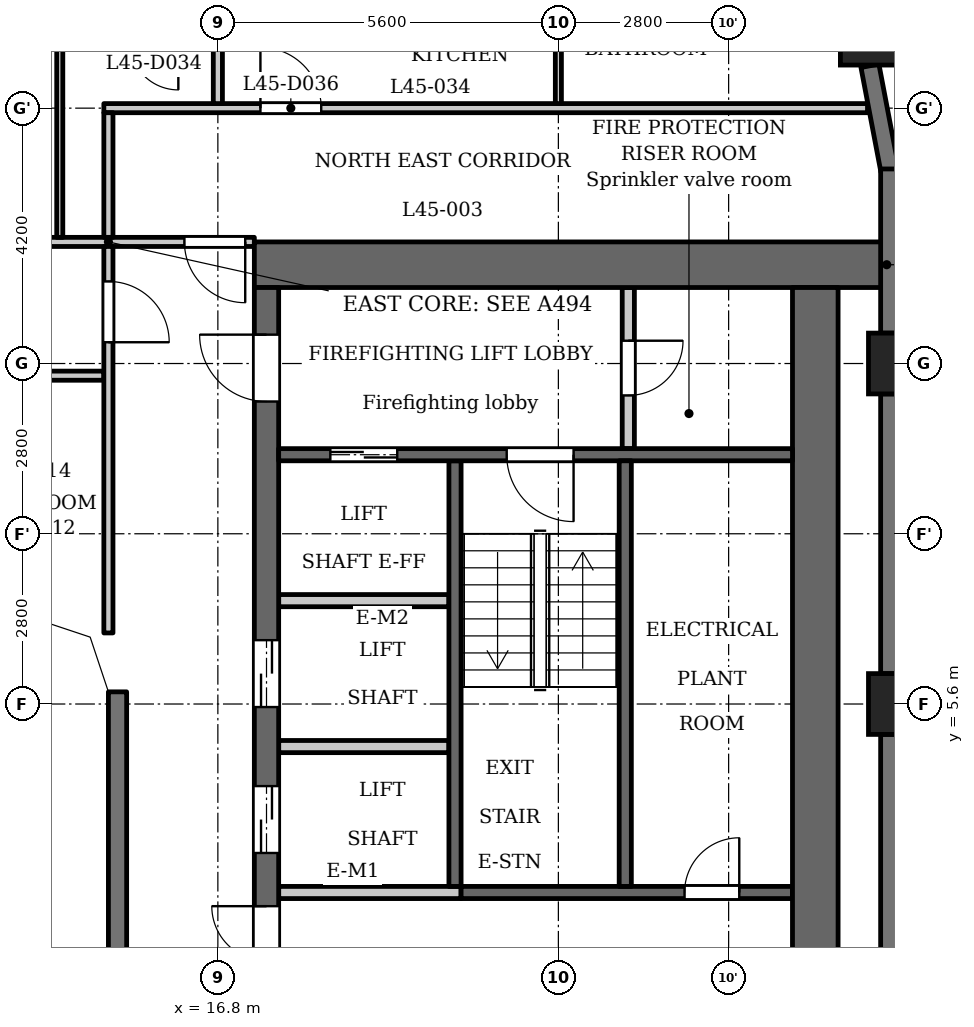
"""IFC4 building model, lengths in metres.
Left out: names, types, materials, properties, quantities, classifications, styles, units other than length and angle.
Written with IfcOpenShell. Run it as: python <this file> out.ifc"""

import sys

from ifc_helpers import new_model, si_unit, direction, frame, frame_2d, origin, origin_2d, place, context, subcontext, project, spatial, polyline, rectangle, outline, extrude, element, fill, save


model = new_model("IFC4")
c1 = context("Model", 3, precision=1e-05, world=origin(), true_north=direction((0.0, 1.0)))
c2 = subcontext(c1, "Body", "Model", "MODEL_VIEW")
j1 = project(units=[si_unit("LENGTHUNIT", "METRE"), si_unit("PLANEANGLEUNIT", "RADIAN")], contexts=[c1])
p1 = place(None, origin())
s1 = spatial("IfcSite", under=j1, at=p1, CompositionType="ELEMENT")
p2 = place(p1, origin())
s2 = spatial("IfcBuilding", under=s1, at=p2, CompositionType="ELEMENT")
p3 = place(p2, frame((0.0, 0.0, 174.6)))
s3 = spatial("IfcBuildingStorey", under=s2, at=p3, CompositionType="ELEMENT", Elevation=174.6)
for number, where, z_axis, x_axis in (
    (1, (28.0, 5.6, 0.0), (0.0, 0.0, 1.0), (1.0, 0.0, 0.0)),
    (2, (28.0, 11.2, 0.0), (0.0, 0.0, 1.0), (1.0, 0.0, 0.0)),
    (3, (27.538, 16.609, 0.0), (0.0, 0.0, 1.0), (1.0, 0.0, 0.0)),
):
    element("IfcColumn", number, at=place(p3, frame(where, z_axis=z_axis, x_axis=x_axis)), inside=s3, PredefinedType="COLUMN", context=c2, shape_type="SweptSolid", body=[
        extrude(rectangle(XDim=1.0, YDim=1.0, at=origin_2d()), origin(), (0.0, 0.0, 1.0), 3.5),
    ])
p4 = place(p3, frame((27.85, 0.5, 0.0), z_axis=(0.0, 0.0, 1.0), x_axis=(0.0, 1.0, 0.0)))
e4 = element("IfcWall", 4, at=p4, inside=s3, PredefinedType="SOLIDWALL", context=c2, shape_type="SweptSolid", body=[
    extrude(rectangle(XDim=4.6, YDim=0.3, at=frame_2d((2.3, 0.0))), origin(), (0.0, 0.0, 1.0), 2.4),
])
p5 = place(p3, frame((27.85, 6.1, 0.0), z_axis=(0.0, 0.0, 1.0), x_axis=(0.0, 1.0, 0.0)))
e5 = element("IfcWall", 5, at=p5, inside=s3, PredefinedType="SOLIDWALL", context=c2, shape_type="SweptSolid", body=[
    extrude(rectangle(XDim=4.6, YDim=0.3, at=frame_2d((2.3, 0.0))), origin(), (0.0, 0.0, 1.0), 2.4),
])
p6 = place(p3, frame((27.85, 11.7, 0.0), z_axis=(0.0, 0.0, 1.0), x_axis=(0.0, 1.0, 0.0)))
e6 = element("IfcWall", 6, at=p6, inside=s3, PredefinedType="SOLIDWALL", context=c2, shape_type="SweptSolid", body=[
    extrude(rectangle(XDim=2.7, YDim=0.3, at=frame_2d((1.35, 0.0))), origin(), (0.0, 0.0, 1.0), 2.4),
])
p7 = place(p3, frame((27.853, 14.372, 0.0), z_axis=(0.0, 0.0, 1.0), x_axis=(-0.187259034321, 0.982310569049, 0.0)))
e7 = element("IfcWall", 7, at=p7, inside=s3, PredefinedType="SOLIDWALL", context=c2, shape_type="SweptSolid", body=[
    extrude(rectangle(XDim=1.756, YDim=0.3, at=frame_2d((0.878, 0.0))), origin(), (0.0, 0.0, 1.0), 2.4),
])
p8 = place(p3, frame((15.15, 5.8, 0.0), z_axis=(0.0, 0.0, 1.0), x_axis=(0.0, -1.0, 0.0)))
e8 = element("IfcWall", 8, at=p8, inside=s3, PredefinedType="SOLIDWALL", context=c2, shape_type="SweptSolid", body=[
    extrude(rectangle(XDim=11.6, YDim=0.3, at=frame_2d((5.8, 0.0))), origin(), (0.0, 0.0, 1.0), 3.15),
])
p9 = place(p3, frame((20.7, 2.6, 0.0), z_axis=(0.0, 0.0, 1.0), x_axis=(0.0, 1.0, 0.0)))
e9 = element("IfcWall", 9, at=p9, inside=s3, PredefinedType="SHEAR", context=c2, shape_type="SweptSolid", body=[
    extrude(rectangle(XDim=7.0, YDim=0.2, at=frame_2d((3.5, 0.0))), origin(), (0.0, 0.0, 1.0), 3.15),
])
p10 = place(p3, frame((20.8, 2.5, 0.0), z_axis=(0.0, 0.0, 1.0), x_axis=(1.0, 0.0, 0.0)))
e10 = element("IfcWall", 10, at=p10, inside=s3, PredefinedType="SHEAR", context=c2, shape_type="SweptSolid", body=[
    extrude(rectangle(XDim=5.45, YDim=0.2, at=frame_2d((2.725, 0.0))), origin(), (0.0, 0.0, 1.0), 3.15),
])
p11 = place(p10, frame((3.675, 0.0, 0.0)))
e11 = element("IfcOpeningElement", 11, at=p11, cuts=e10, PredefinedType="OPENING", context=c2, shape_type="SweptSolid", body=[
    extrude(rectangle(XDim=0.9, YDim=2.1, at=frame_2d((0.45, 1.05))), frame((0.0, 0.11, 0.0), z_axis=(0.0, -1.0, 0.0), x_axis=(1.0, 0.0, 0.0)), (0.0, 0.0, 1.0), 0.22),
])
p12 = place(p3, frame((17.4, 12.825, 0.0), z_axis=(0.0, 0.0, 1.0), x_axis=(1.0, 0.0, 0.0)))
e12 = element("IfcWall", 12, at=p12, inside=s3, PredefinedType="SHEAR", context=c2, shape_type="SweptSolid", body=[
    extrude(rectangle(XDim=10.4, YDim=0.75, at=frame_2d((5.2, 0.0))), origin(), (0.0, 0.0, 1.0), 3.15),
])
p13 = place(p3, frame((17.6, -12.45, 0.0), z_axis=(0.0, 0.0, 1.0), x_axis=(0.0, 1.0, 0.0)))
e13 = element("IfcWall", 13, at=p13, inside=s3, PredefinedType="SHEAR", context=c2, shape_type="SweptSolid", body=[
    extrude(rectangle(XDim=24.9, YDim=0.4, at=frame_2d((12.45, 0.0))), origin(), (0.0, 0.0, 1.0), 3.15),
])
p14 = place(p13, frame((8.65, 0.0, 0.0)))
e14 = element("IfcOpeningElement", 14, at=p14, cuts=e13, PredefinedType="OPENING", context=c2, shape_type="SweptSolid", body=[
    extrude(rectangle(XDim=0.9, YDim=2.1, at=frame_2d((0.45, 1.05))), frame((0.0, 0.21, 0.0), z_axis=(0.0, -1.0, 0.0), x_axis=(1.0, 0.0, 0.0)), (0.0, 0.0, 1.0), 0.42),
])
p15 = place(p13, frame((15.6, 0.0, 0.0)))
e15 = element("IfcOpeningElement", 15, at=p15, cuts=e13, PredefinedType="OPENING", context=c2, shape_type="SweptSolid", body=[
    extrude(rectangle(XDim=1.1, YDim=2.1, at=frame_2d((0.55, 1.05))), frame((0.0, 0.21, 0.0), z_axis=(0.0, -1.0, 0.0), x_axis=(1.0, 0.0, 0.0)), (0.0, 0.0, 1.0), 0.42),
])
p16 = place(p13, frame((18.0, 0.0, 0.0)))
e16 = element("IfcOpeningElement", 16, at=p16, cuts=e13, PredefinedType="OPENING", context=c2, shape_type="SweptSolid", body=[
    extrude(rectangle(XDim=1.1, YDim=2.1, at=frame_2d((0.55, 1.05))), frame((0.0, 0.21, 0.0), z_axis=(0.0, -1.0, 0.0), x_axis=(1.0, 0.0, 0.0)), (0.0, 0.0, 1.0), 0.42),
])
p17 = place(p13, frame((23.025, 0.0, 0.0)))
e17 = element("IfcOpeningElement", 17, at=p17, cuts=e13, PredefinedType="OPENING", context=c2, shape_type="SweptSolid", body=[
    extrude(rectangle(XDim=1.1, YDim=2.1, at=frame_2d((0.55, 1.05))), frame((0.0, 0.21, 0.0), z_axis=(0.0, -1.0, 0.0), x_axis=(1.0, 0.0, 0.0)), (0.0, 0.0, 1.0), 0.42),
])
p18 = place(p13, frame((0.775, 0.0, 0.0)))
e18 = element("IfcOpeningElement", 18, at=p18, cuts=e13, PredefinedType="OPENING", context=c2, shape_type="SweptSolid", body=[
    extrude(rectangle(XDim=1.1, YDim=2.1, at=frame_2d((0.55, 1.05))), frame((0.0, 0.21, 0.0), z_axis=(0.0, -1.0, 0.0), x_axis=(1.0, 0.0, 0.0)), (0.0, 0.0, 1.0), 0.42),
])
p19 = place(p13, frame((12.925, 0.0, 0.0)))
e19 = element("IfcOpeningElement", 19, at=p19, cuts=e13, PredefinedType="OPENING", context=c2, shape_type="SweptSolid", body=[
    extrude(rectangle(XDim=1.8, YDim=2.1, at=frame_2d((0.9, 1.05))), frame((0.0, 0.21, 0.0), z_axis=(0.0, -1.0, 0.0), x_axis=(1.0, 0.0, 0.0)), (0.0, 0.0, 1.0), 0.42),
])
p20 = place(p3, frame((26.625, -12.45, 0.0), z_axis=(0.0, 0.0, 1.0), x_axis=(0.0, 1.0, 0.0)))
e20 = element("IfcWall", 20, at=p20, inside=s3, PredefinedType="SHEAR", context=c2, shape_type="SweptSolid", body=[
    extrude(rectangle(XDim=24.9, YDim=0.75, at=frame_2d((12.45, 0.0))), origin(), (0.0, 0.0, 1.0), 3.15),
])
p21 = place(p3, frame((23.55, 9.8, 0.0), z_axis=(0.0, 0.0, 1.0), x_axis=(0.0, 1.0, 0.0)))
e21 = element("IfcWall", 21, at=p21, inside=s3, PredefinedType="PARTITIONING", context=c2, shape_type="SweptSolid", body=[
    extrude(rectangle(XDim=2.65, YDim=0.2, at=frame_2d((1.325, 0.0))), origin(), (0.0, 0.0, 1.0), 3.15),
])
p22 = place(p21, frame((0.875, 0.0, 0.0)))
e22 = element("IfcOpeningElement", 22, at=p22, cuts=e21, PredefinedType="OPENING", context=c2, shape_type="SweptSolid", body=[
    extrude(rectangle(XDim=0.9, YDim=2.1, at=frame_2d((0.45, 1.05))), frame((0.0, 0.11, 0.0), z_axis=(0.0, -1.0, 0.0), x_axis=(1.0, 0.0, 0.0)), (0.0, 0.0, 1.0), 0.22),
])
p23 = place(p3, frame((17.8, 2.5, 0.0), z_axis=(0.0, 0.0, 1.0), x_axis=(1.0, 0.0, 0.0)))
e23 = element("IfcWall", 23, at=p23, inside=s3, PredefinedType="PARTITIONING", context=c2, shape_type="SweptSolid", body=[
    extrude(rectangle(XDim=3.0, YDim=0.2, at=frame_2d((1.5, 0.0))), origin(), (0.0, 0.0, 1.0), 3.15),
])
for number, where, z_axis, x_axis in (
    (24, (17.8, 4.9, 0.0), (0.0, 0.0, 1.0), (1.0, 0.0, 0.0)),
    (25, (17.8, 7.3, 0.0), (0.0, 0.0, 1.0), (1.0, 0.0, 0.0)),
):
    element("IfcWall", number, at=place(p3, frame(where, z_axis=z_axis, x_axis=x_axis)), inside=s3, PredefinedType="PARTITIONING", context=c2, shape_type="SweptSolid", body=[
        extrude(rectangle(XDim=2.8, YDim=0.2, at=frame_2d((1.4, 0.0))), origin(), (0.0, 0.0, 1.0), 3.15),
    ])
p24 = place(p3, frame((17.8, 9.7, 0.0), z_axis=(0.0, 0.0, 1.0), x_axis=(1.0, 0.0, 0.0)))
e26 = element("IfcWall", 26, at=p24, inside=s3, PredefinedType="SHEAR", context=c2, shape_type="SweptSolid", body=[
    extrude(rectangle(XDim=8.45, YDim=0.2, at=frame_2d((4.225, 0.0))), origin(), (0.0, 0.0, 1.0), 3.15),
])
p25 = place(p24, frame((0.85, 0.0, 0.0)))
e27 = element("IfcOpeningElement", 27, at=p25, cuts=e26, PredefinedType="OPENING", context=c2, shape_type="SweptSolid", body=[
    extrude(rectangle(XDim=1.1, YDim=2.1, at=frame_2d((0.55, 1.05))), frame((0.0, 0.11, 0.0), z_axis=(0.0, -1.0, 0.0), x_axis=(1.0, 0.0, 0.0)), (0.0, 0.0, 1.0), 0.22),
])
p26 = place(p24, frame((3.75, 0.0, 0.0)))
e28 = element("IfcOpeningElement", 28, at=p26, cuts=e26, PredefinedType="OPENING", context=c2, shape_type="SweptSolid", body=[
    extrude(rectangle(XDim=1.1, YDim=2.1, at=frame_2d((0.55, 1.05))), frame((0.0, 0.11, 0.0), z_axis=(0.0, -1.0, 0.0), x_axis=(1.0, 0.0, 0.0)), (0.0, 0.0, 1.0), 0.22),
])
p27 = place(p3, frame((23.5, 2.6, 0.0), z_axis=(0.0, 0.0, 1.0), x_axis=(0.0, 1.0, 0.0)))
e29 = element("IfcWall", 29, at=p27, inside=s3, PredefinedType="SHEAR", context=c2, shape_type="SweptSolid", body=[
    extrude(rectangle(XDim=7.0, YDim=0.2, at=frame_2d((3.5, 0.0))), origin(), (0.0, 0.0, 1.0), 3.15),
])
p28 = place(p3, frame((-14.925, 11.0, 0.0), z_axis=(0.0, 0.0, 1.0), x_axis=(1.0, 0.0, 0.0)))
e30 = element("IfcWall", 30, at=p28, inside=s3, PredefinedType="PARTITIONING", context=c2, shape_type="SweptSolid", body=[
    extrude(rectangle(XDim=29.85, YDim=0.15, at=frame_2d((14.925, 0.0))), origin(), (0.0, 0.0, 1.0), 3.15),
])
p29 = place(p28, frame((2.475, 0.0, 0.0)))
e31 = element("IfcOpeningElement", 31, at=p29, cuts=e30, PredefinedType="OPENING", context=c2, shape_type="SweptSolid", body=[
    extrude(rectangle(XDim=1.0, YDim=2.1, at=frame_2d((0.5, 1.05))), frame((0.0, 0.085, 0.0), z_axis=(0.0, -1.0, 0.0), x_axis=(1.0, 0.0, 0.0)), (0.0, 0.0, 1.0), 0.17),
])
p30 = place(p28, frame((26.275, 0.0, 0.0)))
e32 = element("IfcOpeningElement", 32, at=p30, cuts=e30, PredefinedType="OPENING", context=c2, shape_type="SweptSolid", body=[
    extrude(rectangle(XDim=1.0, YDim=2.1, at=frame_2d((0.5, 1.05))), frame((0.0, 0.085, 0.0), z_axis=(0.0, -1.0, 0.0), x_axis=(1.0, 0.0, 0.0)), (0.0, 0.0, 1.0), 0.17),
])
p31 = place(p3, frame((-17.4, 13.2, 0.0), z_axis=(0.0, 0.0, 1.0), x_axis=(1.0, 0.0, 0.0)))
e33 = element("IfcWall", 33, at=p31, inside=s3, PredefinedType="PARTITIONING", context=c2, shape_type="SweptSolid", body=[
    extrude(rectangle(XDim=34.8, YDim=0.15, at=frame_2d((17.4, 0.0))), origin(), (0.0, 0.0, 1.0), 3.15),
])
p32 = place(p31, frame((0.25, 0.0, 0.0)))
e34 = element("IfcOpeningElement", 34, at=p32, cuts=e33, PredefinedType="OPENING", context=c2, shape_type="SweptSolid", body=[
    extrude(rectangle(XDim=1.0, YDim=2.1, at=frame_2d((0.5, 1.05))), frame((0.0, 0.085, 0.0), z_axis=(0.0, -1.0, 0.0), x_axis=(1.0, 0.0, 0.0)), (0.0, 0.0, 1.0), 0.17),
])
p33 = place(p31, frame((33.65, 0.0, 0.0)))
e35 = element("IfcOpeningElement", 35, at=p33, cuts=e33, PredefinedType="OPENING", context=c2, shape_type="SweptSolid", body=[
    extrude(rectangle(XDim=1.0, YDim=2.1, at=frame_2d((0.5, 1.05))), frame((0.0, 0.085, 0.0), z_axis=(0.0, -1.0, 0.0), x_axis=(1.0, 0.0, 0.0)), (0.0, 0.0, 1.0), 0.17),
])
p34 = place(p31, frame((10.15, 0.0, 0.0)))
e36 = element("IfcOpeningElement", 36, at=p34, cuts=e33, PredefinedType="OPENING", context=c2, shape_type="SweptSolid", body=[
    extrude(rectangle(XDim=1.0, YDim=2.1, at=frame_2d((0.5, 1.05))), frame((0.0, 0.085, 0.0), z_axis=(0.0, -1.0, 0.0), x_axis=(1.0, 0.0, 0.0)), (0.0, 0.0, 1.0), 0.17),
])
p35 = place(p31, frame((15.75, 0.0, 0.0)))
e37 = element("IfcOpeningElement", 37, at=p35, cuts=e33, PredefinedType="OPENING", context=c2, shape_type="SweptSolid", body=[
    extrude(rectangle(XDim=1.0, YDim=2.1, at=frame_2d((0.5, 1.05))), frame((0.0, 0.085, 0.0), z_axis=(0.0, -1.0, 0.0), x_axis=(1.0, 0.0, 0.0)), (0.0, 0.0, 1.0), 0.17),
])
p36 = place(p31, frame((24.95, 0.0, 0.0)))
e38 = element("IfcOpeningElement", 38, at=p36, cuts=e33, PredefinedType="OPENING", context=c2, shape_type="SweptSolid", body=[
    extrude(rectangle(XDim=1.0, YDim=2.1, at=frame_2d((0.5, 1.05))), frame((0.0, 0.085, 0.0), z_axis=(0.0, -1.0, 0.0), x_axis=(1.0, 0.0, 0.0)), (0.0, 0.0, 1.0), 0.17),
])
p37 = place(p31, frame((29.95, 0.0, 0.0)))
e39 = element("IfcOpeningElement", 39, at=p37, cuts=e33, PredefinedType="OPENING", context=c2, shape_type="SweptSolid", body=[
    extrude(rectangle(XDim=1.0, YDim=2.1, at=frame_2d((0.5, 1.05))), frame((0.0, 0.085, 0.0), z_axis=(0.0, -1.0, 0.0), x_axis=(1.0, 0.0, 0.0)), (0.0, 0.0, 1.0), 0.17),
])
p38 = place(p3, frame((14.925, 15.4, 0.0), z_axis=(0.0, 0.0, 1.0), x_axis=(1.0, 0.0, 0.0)))
e40 = element("IfcWall", 40, at=p38, inside=s3, PredefinedType="PARTITIONING", context=c2, shape_type="SweptSolid", body=[
    extrude(rectangle(XDim=12.559, YDim=0.15, at=frame_2d((6.279, 0.0))), origin(), (0.0, 0.0, 1.0), 3.15),
])
p39 = place(p38, frame((2.575, 0.0, 0.0)))
e41 = element("IfcOpeningElement", 41, at=p39, cuts=e40, PredefinedType="OPENING", context=c2, shape_type="SweptSolid", body=[
    extrude(rectangle(XDim=1.0, YDim=2.1, at=frame_2d((0.5, 1.05))), frame((0.0, 0.085, 0.0), z_axis=(0.0, -1.0, 0.0), x_axis=(1.0, 0.0, 0.0)), (0.0, 0.0, 1.0), 0.17),
])
p40 = place(p3, frame((14.2, 13.275, 0.0), z_axis=(0.0, 0.0, 1.0), x_axis=(0.0, 1.0, 0.0)))
e42 = element("IfcWall", 42, at=p40, inside=s3, PredefinedType="PARTITIONING", context=c2, shape_type="SweptSolid", body=[
    extrude(rectangle(XDim=3.175, YDim=0.1, at=frame_2d((1.587, 0.0))), origin(), (0.0, 0.0, 1.0), 3.15),
])
p41 = place(p3, frame((15.0, 6.769, 0.0), z_axis=(0.0, 0.0, 1.0), x_axis=(0.0, 1.0, 0.0)))
e43 = element("IfcWall", 43, at=p41, inside=s3, PredefinedType="PARTITIONING", context=c2, shape_type="SweptSolid", body=[
    extrude(rectangle(XDim=6.356, YDim=0.15, at=frame_2d((3.178, 0.0))), origin(), (0.0, 0.0, 1.0), 3.15),
])
p42 = place(p41, frame((4.781, 0.0, 0.0)))
e44 = element("IfcOpeningElement", 44, at=p42, cuts=e43, PredefinedType="OPENING", context=c2, shape_type="SweptSolid", body=[
    extrude(rectangle(XDim=1.0, YDim=2.1, at=frame_2d((0.5, 1.05))), frame((0.0, 0.085, 0.0), z_axis=(0.0, -1.0, 0.0), x_axis=(1.0, 0.0, 0.0)), (0.0, 0.0, 1.0), 0.17),
])
p43 = place(p3, frame((15.0, 13.275, 0.0), z_axis=(0.0, 0.0, 1.0), x_axis=(0.0, 1.0, 0.0)))
e45 = element("IfcWall", 45, at=p43, inside=s3, PredefinedType="PARTITIONING", context=c2, shape_type="SweptSolid", body=[
    extrude(rectangle(XDim=2.05, YDim=0.15, at=frame_2d((1.025, 0.0))), origin(), (0.0, 0.0, 1.0), 3.15),
])
p44 = place(p3, frame((16.8, 15.475, 0.0), z_axis=(0.0, 0.0, 1.0), x_axis=(0.0, 1.0, 0.0)))
e46 = element("IfcWall", 46, at=p44, inside=s3, PredefinedType="PARTITIONING", context=c2, shape_type="SweptSolid", body=[
    extrude(rectangle(XDim=7.405, YDim=0.15, at=frame_2d((3.702, 0.0))), origin(), (0.0, 0.0, 1.0), 3.15),
])
p45 = place(p3, frame((22.4, 15.475, 0.0), z_axis=(0.0, 0.0, 1.0), x_axis=(0.0, 1.0, 0.0)))
e47 = element("IfcWall", 47, at=p45, inside=s3, PredefinedType="PARTITIONING", context=c2, shape_type="SweptSolid", body=[
    extrude(rectangle(XDim=2.275, YDim=0.1, at=frame_2d((1.137, 0.0))), origin(), (0.0, 0.0, 1.0), 3.15),
])
p46 = place(p3, origin())
e48 = element("IfcWall", 48, at=p46, inside=s3, PredefinedType="SOLIDWALL", context=c2, shape_type="SweptSolid", body=[
    extrude(outline(polyline([(14.937, 6.937), (13.849, 7.3), (13.8, 7.3), (13.8, 7.0), (14.7, 6.7), (15.0, 5.8), (15.3, 5.8), (15.3, 5.849), (14.937, 6.937)])), origin(), (0.0, 0.0, 1.0), 3.15),
])
p47 = place(p15, origin())
e49 = element("IfcDoor", 49, at=p47, inside=s3, OperationType="DOUBLE_DOOR_SLIDING", PredefinedType="DOOR", context=c2, shape_type="SweptSolid", body=[
    extrude(rectangle(XDim=1.1, YDim=2.1, at=frame_2d((0.55, 1.05))), frame((0.0, 0.025, 0.0), z_axis=(0.0, -1.0, 0.0), x_axis=(1.0, 0.0, 0.0)), (0.0, 0.0, 1.0), 0.05),
])
fill(e15, e49)
p48 = place(p16, origin())
e50 = element("IfcDoor", 50, at=p48, inside=s3, OperationType="DOUBLE_DOOR_SLIDING", PredefinedType="DOOR", context=c2, shape_type="SweptSolid", body=[
    extrude(rectangle(XDim=1.1, YDim=2.1, at=frame_2d((0.55, 1.05))), frame((0.0, 0.025, 0.0), z_axis=(0.0, -1.0, 0.0), x_axis=(1.0, 0.0, 0.0)), (0.0, 0.0, 1.0), 0.05),
])
fill(e16, e50)
p49 = place(p25, origin())
e51 = element("IfcDoor", 51, at=p49, inside=s3, OperationType="DOUBLE_DOOR_SLIDING", PredefinedType="DOOR", context=c2, shape_type="SweptSolid", body=[
    extrude(rectangle(XDim=1.1, YDim=2.1, at=frame_2d((0.55, 1.05))), frame((0.0, 0.025, 0.0), z_axis=(0.0, -1.0, 0.0), x_axis=(1.0, 0.0, 0.0)), (0.0, 0.0, 1.0), 0.05),
])
fill(e27, e51)
p50 = place(p17, origin())
e52 = element("IfcDoor", 52, at=p50, inside=s3, OperationType="SINGLE_SWING_LEFT", PredefinedType="DOOR", context=c2, shape_type="SweptSolid", body=[
    extrude(rectangle(XDim=1.1, YDim=2.1, at=frame_2d((0.55, 1.05))), frame((0.0, 0.025, 0.0), z_axis=(0.0, -1.0, 0.0), x_axis=(1.0, 0.0, 0.0)), (0.0, 0.0, 1.0), 0.05),
])
fill(e17, e52)
p51 = place(p22, origin())
e53 = element("IfcDoor", 53, at=p51, inside=s3, OperationType="SINGLE_SWING_RIGHT", PredefinedType="DOOR", context=c2, shape_type="SweptSolid", body=[
    extrude(rectangle(XDim=0.9, YDim=2.1, at=frame_2d((0.45, 1.05))), frame((0.0, 0.025, 0.0), z_axis=(0.0, -1.0, 0.0), x_axis=(1.0, 0.0, 0.0)), (0.0, 0.0, 1.0), 0.05),
])
fill(e22, e53)
p52 = place(p26, origin())
e54 = element("IfcDoor", 54, at=p52, inside=s3, OperationType="SINGLE_SWING_RIGHT", PredefinedType="DOOR", context=c2, shape_type="SweptSolid", body=[
    extrude(rectangle(XDim=1.1, YDim=2.1, at=frame_2d((0.55, 1.05))), frame((0.0, 0.025, 0.0), z_axis=(0.0, -1.0, 0.0), x_axis=(1.0, 0.0, 0.0)), (0.0, 0.0, 1.0), 0.05),
])
fill(e28, e54)
p53 = place(p19, origin())
e55 = element("IfcDoor", 55, at=p53, inside=s3, OperationType="DOUBLE_DOOR_SINGLE_SWING", PredefinedType="DOOR", context=c2, shape_type="SweptSolid", body=[
    extrude(rectangle(XDim=1.8, YDim=2.1, at=frame_2d((0.9, 1.05))), frame((0.0, 0.025, 0.0), z_axis=(0.0, -1.0, 0.0), x_axis=(1.0, 0.0, 0.0)), (0.0, 0.0, 1.0), 0.05),
])
fill(e19, e55)
p54 = place(p11, origin())
e56 = element("IfcDoor", 56, at=p54, inside=s3, OperationType="SINGLE_SWING_LEFT", PredefinedType="DOOR", context=c2, shape_type="SweptSolid", body=[
    extrude(rectangle(XDim=0.9, YDim=2.1, at=frame_2d((0.45, 1.05))), frame((0.0, 0.025, 0.0), z_axis=(0.0, -1.0, 0.0), x_axis=(1.0, 0.0, 0.0)), (0.0, 0.0, 1.0), 0.05),
])
fill(e11, e56)
p55 = place(p42, origin())
e57 = element("IfcDoor", 57, at=p55, inside=s3, OperationType="SINGLE_SWING_LEFT", PredefinedType="DOOR", context=c2, shape_type="SweptSolid", body=[
    extrude(rectangle(XDim=1.0, YDim=2.1, at=frame_2d((0.5, 1.05))), frame((0.0, 0.025, 0.0), z_axis=(0.0, -1.0, 0.0), x_axis=(1.0, 0.0, 0.0)), (0.0, 0.0, 1.0), 0.05),
])
fill(e44, e57)
p56 = place(p33, origin())
e58 = element("IfcDoor", 58, at=p56, inside=s3, OperationType="SINGLE_SWING_RIGHT", PredefinedType="DOOR", context=c2, shape_type="SweptSolid", body=[
    extrude(rectangle(XDim=1.0, YDim=2.1, at=frame_2d((0.5, 1.05))), frame((0.0, 0.025, 0.0), z_axis=(0.0, -1.0, 0.0), x_axis=(1.0, 0.0, 0.0)), (0.0, 0.0, 1.0), 0.05),
])
fill(e35, e58)
p57 = place(p39, origin())
e59 = element("IfcDoor", 59, at=p57, inside=s3, OperationType="SINGLE_SWING_RIGHT", PredefinedType="DOOR", context=c2, shape_type="SweptSolid", body=[
    extrude(rectangle(XDim=1.0, YDim=2.1, at=frame_2d((0.5, 1.05))), frame((0.0, 0.025, 0.0), z_axis=(0.0, -1.0, 0.0), x_axis=(1.0, 0.0, 0.0)), (0.0, 0.0, 1.0), 0.05),
])
fill(e41, e59)
save(model, sys.argv[1])
